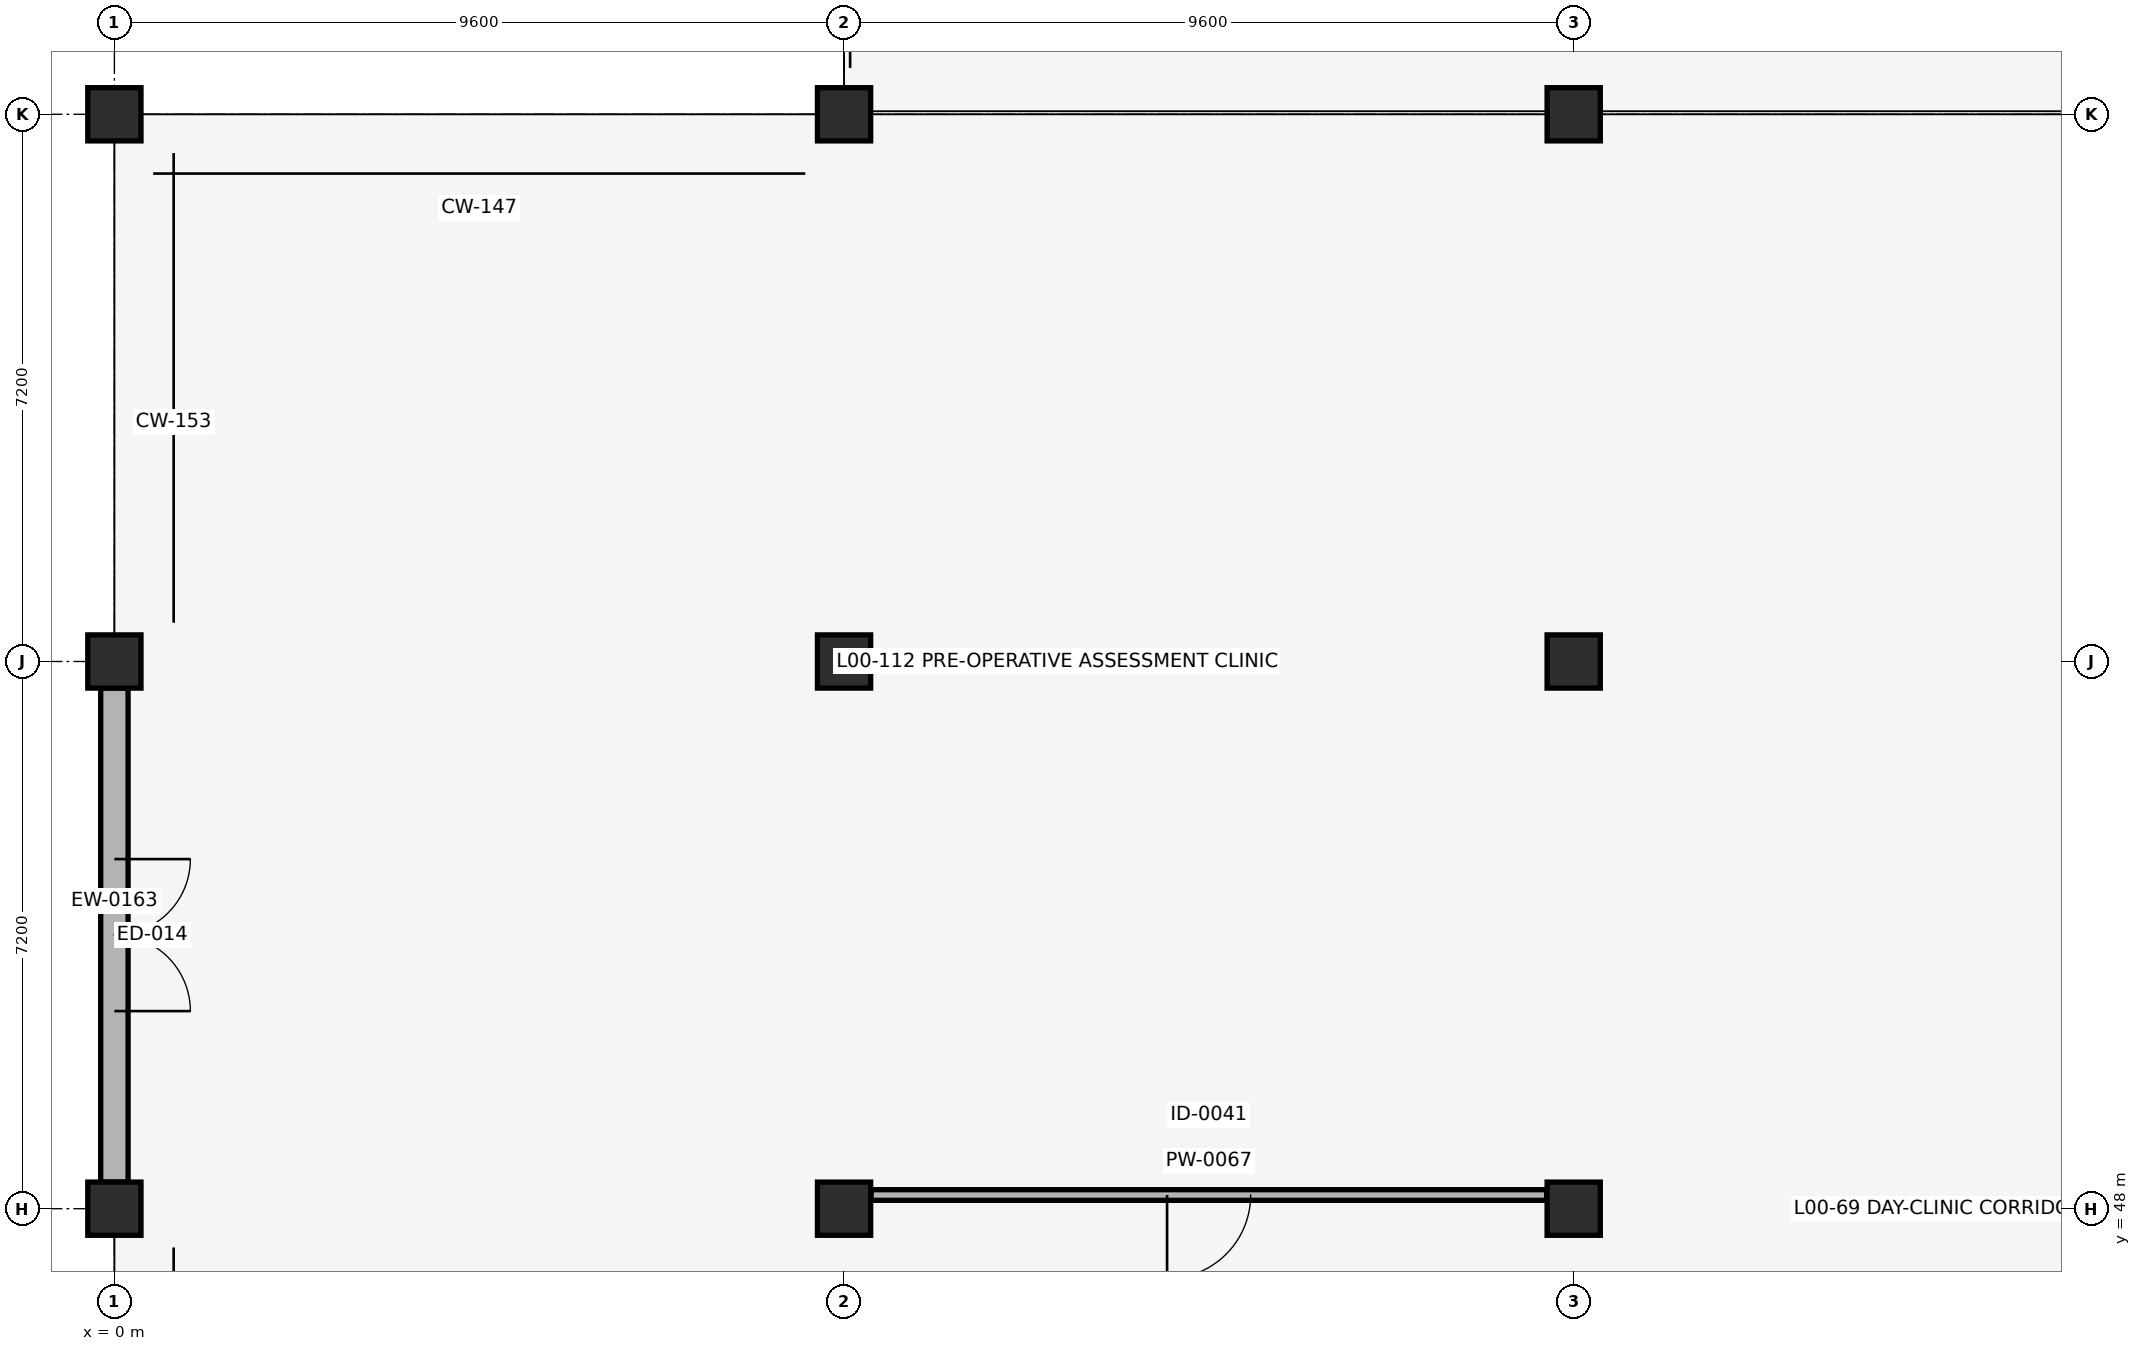
"""IFC4 building model, lengths in metres.
Left out: names, types, materials, properties, quantities, classifications, styles, units other than length and angle.
Written with IfcOpenShell. Run it as: python <this file> out.ifc"""

import sys

from ifc_helpers import new_model, si_unit, direction, frame, frame_2d, origin, origin_2d, place, context, subcontext, project, spatial, rectangle, circle, extrude, element, fill, save


model = new_model("IFC4")
c1 = context("Model", 3, precision=1e-05, world=origin(), true_north=direction((0.0, 1.0)))
c2 = subcontext(c1, "Body", "Model", "MODEL_VIEW")
j1 = project(units=[si_unit("LENGTHUNIT", "METRE"), si_unit("PLANEANGLEUNIT", "RADIAN")], contexts=[c1])
p1 = place(None, origin())
s1 = spatial("IfcSite", under=j1, at=p1, CompositionType="ELEMENT")
p2 = place(p1, origin())
s2 = spatial("IfcBuilding", under=s1, at=p2, CompositionType="ELEMENT")
p3 = place(p2, origin())
s3 = spatial("IfcBuildingStorey", under=s2, at=p3, CompositionType="ELEMENT", Elevation=0.0)
for number, where, z_axis, x_axis in (
    (1, (0.0, 48.0, 0.0), (0.0, 0.0, 1.0), (1.0, 0.0, 0.0)),
    (2, (0.0, 55.2, 0.0), (0.0, 0.0, 1.0), (1.0, 0.0, 0.0)),
    (3, (0.0, 62.4, 0.0), (0.0, 0.0, 1.0), (1.0, 0.0, 0.0)),
    (4, (9.6, 48.0, 0.0), (0.0, 0.0, 1.0), (1.0, 0.0, 0.0)),
    (5, (9.6, 55.2, 0.0), (0.0, 0.0, 1.0), (1.0, 0.0, 0.0)),
    (6, (9.6, 62.4, 0.0), (0.0, 0.0, 1.0), (1.0, 0.0, 0.0)),
    (7, (19.2, 48.0, 0.0), (0.0, 0.0, 1.0), (1.0, 0.0, 0.0)),
    (8, (19.2, 55.2, 0.0), (0.0, 0.0, 1.0), (1.0, 0.0, 0.0)),
    (9, (19.2, 62.4, 0.0), (0.0, 0.0, 1.0), (1.0, 0.0, 0.0)),
):
    element("IfcColumn", number, at=place(p3, frame(where, z_axis=z_axis, x_axis=x_axis)), inside=s3, PredefinedType="COLUMN", context=c2, shape_type="SweptSolid", body=[
        extrude(circle(Radius=0.35, at=origin_2d()), origin(), (0.0, 0.0, 1.0), 4.42),
    ])
p4 = place(p3, frame((0.0, 54.85, 0.0), z_axis=(0.0, 0.0, 1.0), x_axis=(0.0, -1.0, 0.0)))
e10 = element("IfcWall", 10, at=p4, inside=s3, PredefinedType="SOLIDWALL", context=c2, shape_type="SweptSolid", body=[
    extrude(rectangle(XDim=6.5, YDim=0.36, at=frame_2d((3.25, 0.0))), origin(), (0.0, 0.0, 1.0), 3.4),
])
p5 = place(p4, frame((2.25, 0.0, 0.0)))
e11 = element("IfcOpeningElement", 11, at=p5, cuts=e10, PredefinedType="OPENING", context=c2, shape_type="SweptSolid", body=[
    extrude(rectangle(XDim=2.0, YDim=2.3, at=frame_2d((1.0, 1.15))), frame((0.0, 0.19, 0.0), z_axis=(0.0, -1.0, 0.0), x_axis=(1.0, 0.0, 0.0)), (0.0, 0.0, 1.0), 0.38),
])
p6 = place(p3, frame((9.955, 48.18, 0.0), z_axis=(0.0, 0.0, 1.0), x_axis=(1.0, 0.0, 0.0)))
e12 = element("IfcWall", 12, at=p6, inside=s3, PredefinedType="PARTITIONING", context=c2, shape_type="SweptSolid", body=[
    extrude(rectangle(XDim=8.89, YDim=0.14, at=frame_2d((4.445, 0.0))), origin(), (0.0, 0.0, 1.0), 3.45),
])
p7 = place(p6, frame((3.895, 0.0, 0.0)))
e13 = element("IfcOpeningElement", 13, at=p7, cuts=e12, PredefinedType="OPENING", context=c2, shape_type="SweptSolid", body=[
    extrude(rectangle(XDim=1.1, YDim=2.1, at=frame_2d((0.55, 1.05))), frame((0.0, 0.08, 0.0), z_axis=(0.0, -1.0, 0.0), x_axis=(1.0, 0.0, 0.0)), (0.0, 0.0, 1.0), 0.16),
])
p8 = place(p5, origin())
e14 = element("IfcDoor", 14, at=p8, inside=s3, OperationType="DOUBLE_DOOR_SINGLE_SWING", PredefinedType="DOOR", context=c2, shape_type="SweptSolid", body=[
    extrude(rectangle(XDim=2.0, YDim=2.3, at=frame_2d((1.0, 1.15))), frame((0.0, 0.025, 0.0), z_axis=(0.0, -1.0, 0.0), x_axis=(1.0, 0.0, 0.0)), (0.0, 0.0, 1.0), 0.05),
])
fill(e11, e14)
p9 = place(p7, origin())
e15 = element("IfcDoor", 15, at=p9, inside=s3, OperationType="SINGLE_SWING_RIGHT", PredefinedType="DOOR", context=c2, shape_type="SweptSolid", body=[
    extrude(rectangle(XDim=1.1, YDim=2.1, at=frame_2d((0.55, 1.05))), frame((0.0, 0.025, 0.0), z_axis=(0.0, -1.0, 0.0), x_axis=(1.0, 0.0, 0.0)), (0.0, 0.0, 1.0), 0.05),
])
fill(e13, e15)
save(model, sys.argv[1])
